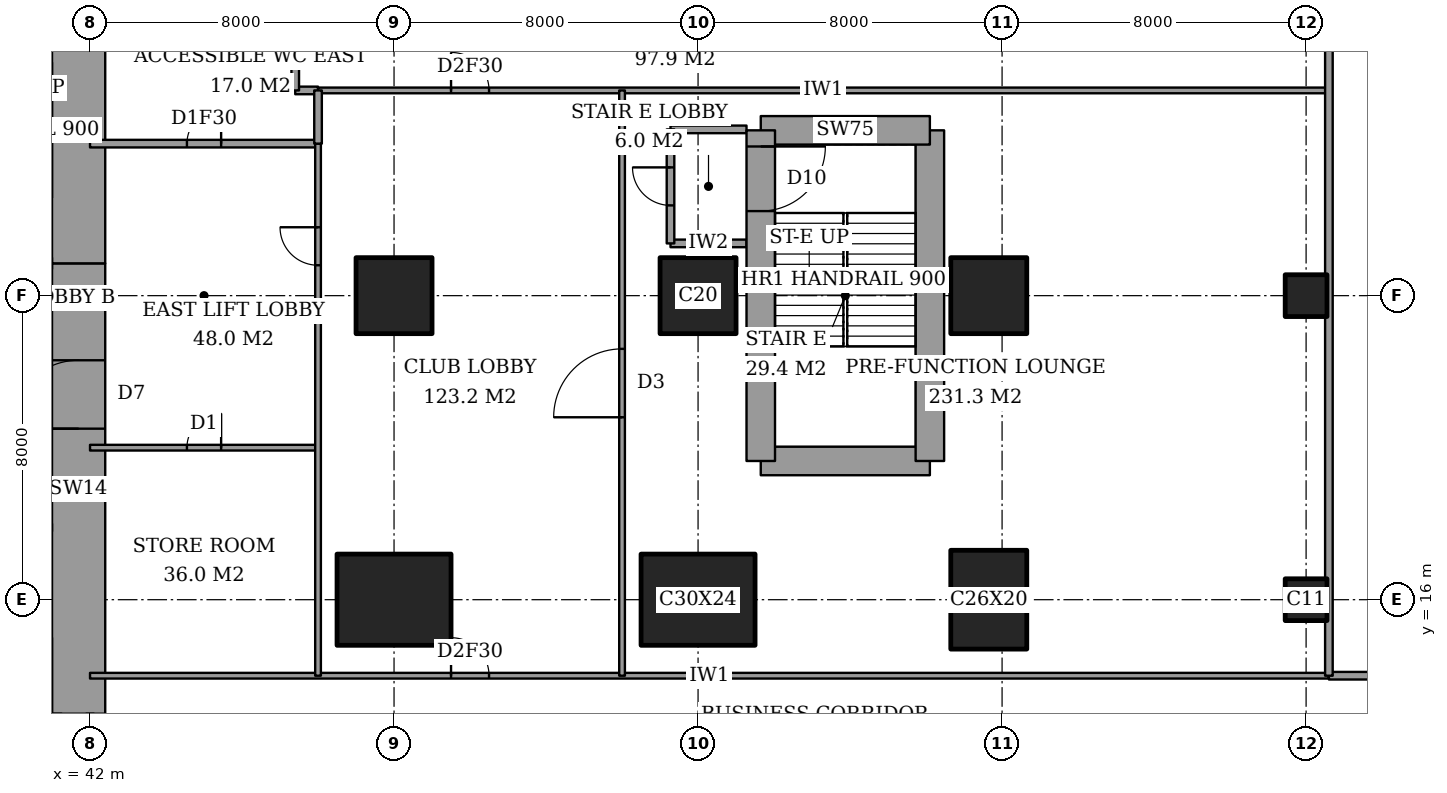
"""IFC4 building model, lengths in metres.
Left out: names, types, materials, properties, quantities, classifications, styles, units other than length and angle.
Written with IfcOpenShell. Run it as: python <this file> out.ifc"""

import sys

from ifc_helpers import new_model, si_unit, direction, frame, frame_2d, origin, origin_2d, place, context, subcontext, project, spatial, rectangle, extrude, element, fill, save


model = new_model("IFC4")
c1 = context("Model", 3, precision=1e-05, world=origin(), true_north=direction((0.0, 1.0)))
c2 = subcontext(c1, "Body", "Model", "MODEL_VIEW")
j1 = project(units=[si_unit("LENGTHUNIT", "METRE"), si_unit("PLANEANGLEUNIT", "RADIAN")], contexts=[c1])
p1 = place(None, origin())
s1 = spatial("IfcSite", under=j1, at=p1, CompositionType="ELEMENT")
p2 = place(p1, origin())
s2 = spatial("IfcBuilding", under=s1, at=p2, CompositionType="ELEMENT")
p3 = place(p2, frame((0.0, 0.0, 6.0)))
s3 = spatial("IfcBuildingStorey", under=s2, at=p3, CompositionType="ELEMENT", Elevation=6.0)
p4 = place(p3, frame((50.0, 16.0, 0.0), z_axis=(0.0, 0.0, 1.0), x_axis=(1.0, 0.0, 0.0)))
e1 = element("IfcColumn", 1, at=p4, inside=s3, PredefinedType="COLUMN", context=c2, shape_type="SweptSolid", body=[
    extrude(rectangle(XDim=3.0, YDim=2.4, at=origin_2d()), origin(), (0.0, 0.0, 1.0), 5.0),
])
p5 = place(p3, frame((50.0, 24.0, 0.0), z_axis=(0.0, 0.0, 1.0), x_axis=(1.0, 0.0, 0.0)))
e2 = element("IfcColumn", 2, at=p5, inside=s3, PredefinedType="COLUMN", context=c2, shape_type="SweptSolid", body=[
    extrude(rectangle(XDim=2.0, YDim=2.0, at=origin_2d()), origin(), (0.0, 0.0, 1.0), 5.0),
])
p6 = place(p3, frame((58.0, 16.0, 0.0), z_axis=(0.0, 0.0, 1.0), x_axis=(1.0, 0.0, 0.0)))
e3 = element("IfcColumn", 3, at=p6, inside=s3, PredefinedType="COLUMN", context=c2, shape_type="SweptSolid", body=[
    extrude(rectangle(XDim=3.0, YDim=2.4, at=origin_2d()), origin(), (0.0, 0.0, 1.0), 5.0),
])
p7 = place(p3, frame((58.0, 24.0, 0.0), z_axis=(0.0, 0.0, 1.0), x_axis=(1.0, 0.0, 0.0)))
e4 = element("IfcColumn", 4, at=p7, inside=s3, PredefinedType="COLUMN", context=c2, shape_type="SweptSolid", body=[
    extrude(rectangle(XDim=2.0, YDim=2.0, at=origin_2d()), origin(), (0.0, 0.0, 1.0), 5.0),
])
p8 = place(p3, frame((65.65, 16.0, 0.0), z_axis=(0.0, 0.0, 1.0), x_axis=(0.0, 1.0, 0.0)))
e5 = element("IfcColumn", 5, at=p8, inside=s3, PredefinedType="COLUMN", context=c2, shape_type="SweptSolid", body=[
    extrude(rectangle(XDim=2.6, YDim=2.0, at=origin_2d()), origin(), (0.0, 0.0, 1.0), 5.0),
])
p9 = place(p3, frame((65.65, 24.0, 0.0), z_axis=(0.0, 0.0, 1.0), x_axis=(1.0, 0.0, 0.0)))
e6 = element("IfcColumn", 6, at=p9, inside=s3, PredefinedType="COLUMN", context=c2, shape_type="SweptSolid", body=[
    extrude(rectangle(XDim=2.0, YDim=2.0, at=origin_2d()), origin(), (0.0, 0.0, 1.0), 5.0),
])
for number, where, z_axis, x_axis in (
    (7, (74.0, 16.0, 0.0), (0.0, 0.0, 1.0), (1.0, 0.0, 0.0)),
    (8, (74.0, 24.0, 0.0), (0.0, 0.0, 1.0), (1.0, 0.0, 0.0)),
):
    element("IfcColumn", number, at=place(p3, frame(where, z_axis=z_axis, x_axis=x_axis)), inside=s3, PredefinedType="COLUMN", context=c2, shape_type="SweptSolid", body=[
        extrude(rectangle(XDim=1.1, YDim=1.1, at=origin_2d()), origin(), (0.0, 0.0, 1.0), 5.0),
    ])
p10 = place(p3, frame((41.7, 13.0, 0.0), z_axis=(0.0, 0.0, 1.0), x_axis=(0.0, 1.0, 0.0)))
e9 = element("IfcWall", 9, at=p10, inside=s3, PredefinedType="SHEAR", context=c2, shape_type="SweptSolid", body=[
    extrude(rectangle(XDim=11.85, YDim=1.4, at=frame_2d((5.925, 0.0))), origin(), (0.0, 0.0, 1.0), 5.0),
])
p11 = place(p10, frame((7.5, 0.0, 0.0)))
e10 = element("IfcOpeningElement", 10, at=p11, cuts=e9, PredefinedType="OPENING", context=c2, shape_type="SweptSolid", body=[
    extrude(rectangle(XDim=1.8, YDim=2.4, at=frame_2d((0.9, 1.2))), frame((0.0, 0.71, 0.0), z_axis=(0.0, -1.0, 0.0), x_axis=(1.0, 0.0, 0.0)), (0.0, 0.0, 1.0), 1.42),
])
p12 = place(p3, frame((41.7, 24.85, 0.0), z_axis=(0.0, 0.0, 1.0), x_axis=(0.0, 1.0, 0.0)))
e11 = element("IfcWall", 11, at=p12, inside=s3, PredefinedType="SHEAR", context=c2, shape_type="SweptSolid", body=[
    extrude(rectangle(XDim=10.15, YDim=1.4, at=frame_2d((5.075, 0.0))), origin(), (0.0, 0.0, 1.0), 5.0),
])
p13 = place(p3, frame((59.65, 19.65, 0.0), z_axis=(0.0, 0.0, 1.0), x_axis=(1.0, 0.0, 0.0)))
e12 = element("IfcWall", 12, at=p13, inside=s3, PredefinedType="SHEAR", context=c2, shape_type="SweptSolid", body=[
    extrude(rectangle(XDim=4.45, YDim=0.75, at=frame_2d((2.225, 0.0))), origin(), (0.0, 0.0, 1.0), 5.0),
])
p14 = place(p3, frame((64.1, 19.65, 0.0), z_axis=(0.0, 0.0, 1.0), x_axis=(0.0, 1.0, 0.0)))
e13 = element("IfcWall", 13, at=p14, inside=s3, PredefinedType="SHEAR", context=c2, shape_type="SweptSolid", body=[
    extrude(rectangle(XDim=8.7, YDim=0.75, at=frame_2d((4.35, 0.0))), origin(), (0.0, 0.0, 1.0), 5.0),
])
p15 = place(p3, frame((64.1, 28.35, 0.0), z_axis=(0.0, 0.0, 1.0), x_axis=(-1.0, 0.0, 0.0)))
e14 = element("IfcWall", 14, at=p15, inside=s3, PredefinedType="SHEAR", context=c2, shape_type="SweptSolid", body=[
    extrude(rectangle(XDim=4.45, YDim=0.75, at=frame_2d((2.225, 0.0))), origin(), (0.0, 0.0, 1.0), 5.0),
])
p16 = place(p3, frame((59.65, 28.35, 0.0), z_axis=(0.0, 0.0, 1.0), x_axis=(0.0, -1.0, 0.0)))
e15 = element("IfcWall", 15, at=p16, inside=s3, PredefinedType="SHEAR", context=c2, shape_type="SweptSolid", body=[
    extrude(rectangle(XDim=8.7, YDim=0.75, at=frame_2d((4.35, 0.0))), origin(), (0.0, 0.0, 1.0), 5.0),
])
p17 = place(p16, frame((0.425, 0.0, 0.0)))
e16 = element("IfcOpeningElement", 16, at=p17, cuts=e15, PredefinedType="OPENING", context=c2, shape_type="SweptSolid", body=[
    extrude(rectangle(XDim=1.7, YDim=2.1, at=frame_2d((0.85, 1.05))), frame((0.0, 0.385, 0.0), z_axis=(0.0, -1.0, 0.0), x_axis=(1.0, 0.0, 0.0)), (0.0, 0.0, 1.0), 0.77),
])
p18 = place(p3, frame((74.6, 14.0, 0.0), z_axis=(0.0, 0.0, 1.0), x_axis=(1.0, 0.0, 0.0)))
e17 = element("IfcWall", 17, at=p18, inside=s3, PredefinedType="PARTITIONING", context=c2, shape_type="SweptSolid", body=[
    extrude(rectangle(XDim=7.85, YDim=0.2, at=frame_2d((3.925, 0.0))), origin(), (0.0, 0.0, 1.0), 4.7),
])
p19 = place(p3, frame((42.0, 14.0, 0.0), z_axis=(0.0, 0.0, 1.0), x_axis=(1.0, 0.0, 0.0)))
e18 = element("IfcWall", 18, at=p19, inside=s3, PredefinedType="PARTITIONING", context=c2, shape_type="SweptSolid", body=[
    extrude(rectangle(XDim=32.6, YDim=0.15, at=frame_2d((16.3, 0.0))), origin(), (0.0, 0.0, 1.0), 4.7),
])
p20 = place(p19, frame((9.5, 0.0, 0.0)))
e19 = element("IfcOpeningElement", 19, at=p20, cuts=e18, PredefinedType="OPENING", context=c2, shape_type="SweptSolid", body=[
    extrude(rectangle(XDim=1.0, YDim=2.1, at=frame_2d((0.5, 1.05))), frame((0.0, 0.085, 0.0), z_axis=(0.0, -1.0, 0.0), x_axis=(1.0, 0.0, 0.0)), (0.0, 0.0, 1.0), 0.17),
])
p21 = place(p3, frame((42.0, 20.0, 0.0), z_axis=(0.0, 0.0, 1.0), x_axis=(1.0, 0.0, 0.0)))
e20 = element("IfcWall", 20, at=p21, inside=s3, PredefinedType="PARTITIONING", context=c2, shape_type="SweptSolid", body=[
    extrude(rectangle(XDim=6.0, YDim=0.15, at=frame_2d((3.0, 0.0))), origin(), (0.0, 0.0, 1.0), 4.7),
])
p22 = place(p21, frame((2.55, 0.0, 0.0)))
e21 = element("IfcOpeningElement", 21, at=p22, cuts=e20, PredefinedType="OPENING", context=c2, shape_type="SweptSolid", body=[
    extrude(rectangle(XDim=0.9, YDim=2.1, at=frame_2d((0.45, 1.05))), frame((0.0, 0.085, 0.0), z_axis=(0.0, -1.0, 0.0), x_axis=(1.0, 0.0, 0.0)), (0.0, 0.0, 1.0), 0.17),
])
p23 = place(p3, frame((57.275, 25.375, 0.0), z_axis=(0.0, 0.0, 1.0), x_axis=(1.0, 0.0, 0.0)))
e22 = element("IfcWall", 22, at=p23, inside=s3, PredefinedType="PARTITIONING", context=c2, shape_type="SweptSolid", body=[
    extrude(rectangle(XDim=2.0, YDim=0.2, at=frame_2d((1.0, 0.0))), origin(), (0.0, 0.0, 1.0), 4.7),
])
p24 = place(p3, frame((42.0, 28.0, 0.0), z_axis=(0.0, 0.0, 1.0), x_axis=(1.0, 0.0, 0.0)))
e23 = element("IfcWall", 23, at=p24, inside=s3, PredefinedType="PARTITIONING", context=c2, shape_type="SweptSolid", body=[
    extrude(rectangle(XDim=6.0, YDim=0.2, at=frame_2d((3.0, 0.0))), origin(), (0.0, 0.0, 1.0), 4.7),
])
p25 = place(p24, frame((2.55, 0.0, 0.0)))
e24 = element("IfcOpeningElement", 24, at=p25, cuts=e23, PredefinedType="OPENING", context=c2, shape_type="SweptSolid", body=[
    extrude(rectangle(XDim=0.9, YDim=2.1, at=frame_2d((0.45, 1.05))), frame((0.0, 0.11, 0.0), z_axis=(0.0, -1.0, 0.0), x_axis=(1.0, 0.0, 0.0)), (0.0, 0.0, 1.0), 0.22),
])
p26 = place(p3, frame((57.275, 28.375, 0.0), z_axis=(0.0, 0.0, 1.0), x_axis=(1.0, 0.0, 0.0)))
e25 = element("IfcWall", 25, at=p26, inside=s3, PredefinedType="PARTITIONING", context=c2, shape_type="SweptSolid", body=[
    extrude(rectangle(XDim=2.0, YDim=0.2, at=frame_2d((1.0, 0.0))), origin(), (0.0, 0.0, 1.0), 4.7),
])
p27 = place(p3, frame((47.4, 29.4, 0.0), z_axis=(0.0, 0.0, 1.0), x_axis=(1.0, 0.0, 0.0)))
e26 = element("IfcWall", 26, at=p27, inside=s3, PredefinedType="PARTITIONING", context=c2, shape_type="SweptSolid", body=[
    extrude(rectangle(XDim=0.6, YDim=0.2, at=frame_2d((0.3, 0.0))), origin(), (0.0, 0.0, 1.0), 4.7),
])
p28 = place(p3, frame((48.0, 29.4, 0.0), z_axis=(0.0, 0.0, 1.0), x_axis=(1.0, 0.0, 0.0)))
e27 = element("IfcWall", 27, at=p28, inside=s3, PredefinedType="PARTITIONING", context=c2, shape_type="SweptSolid", body=[
    extrude(rectangle(XDim=26.6, YDim=0.15, at=frame_2d((13.3, 0.0))), origin(), (0.0, 0.0, 1.0), 4.7),
])
p29 = place(p28, frame((3.5, 0.0, 0.0)))
e28 = element("IfcOpeningElement", 28, at=p29, cuts=e27, PredefinedType="OPENING", context=c2, shape_type="SweptSolid", body=[
    extrude(rectangle(XDim=1.0, YDim=2.1, at=frame_2d((0.5, 1.05))), frame((0.0, 0.085, 0.0), z_axis=(0.0, -1.0, 0.0), x_axis=(1.0, 0.0, 0.0)), (0.0, 0.0, 1.0), 0.17),
])
p30 = place(p3, frame((41.15, -0.45, 0.0), z_axis=(0.0, 0.0, 1.0), x_axis=(0.0, 1.0, 0.0)))
e29 = element("IfcWall", 29, at=p30, inside=s3, PredefinedType="PARTITIONING", context=c2, shape_type="SweptSolid", body=[
    extrude(rectangle(XDim=13.45, YDim=0.2, at=frame_2d((6.725, 0.0))), origin(), (0.0, 0.0, 1.0), 4.7),
])
p31 = place(p3, frame((42.0, 9.3, 0.0), z_axis=(0.0, 0.0, 1.0), x_axis=(0.0, 1.0, 0.0)))
e30 = element("IfcWall", 30, at=p31, inside=s3, PredefinedType="PARTITIONING", context=c2, shape_type="SweptSolid", body=[
    extrude(rectangle(XDim=3.7, YDim=0.2, at=frame_2d((1.85, 0.0))), origin(), (0.0, 0.0, 1.0), 4.7),
])
p32 = place(p3, frame((47.4, 29.4, 0.0), z_axis=(0.0, 0.0, 1.0), x_axis=(0.0, 1.0, 0.0)))
e31 = element("IfcWall", 31, at=p32, inside=s3, PredefinedType="PARTITIONING", context=c2, shape_type="SweptSolid", body=[
    extrude(rectangle(XDim=3.6, YDim=0.2, at=frame_2d((1.8, 0.0))), origin(), (0.0, 0.0, 1.0), 4.7),
])
p33 = place(p3, frame((48.0, 28.0, 0.0), z_axis=(0.0, 0.0, 1.0), x_axis=(0.0, 1.0, 0.0)))
e32 = element("IfcWall", 32, at=p33, inside=s3, PredefinedType="PARTITIONING", context=c2, shape_type="SweptSolid", body=[
    extrude(rectangle(XDim=1.4, YDim=0.2, at=frame_2d((0.7, 0.0))), origin(), (0.0, 0.0, 1.0), 4.7),
])
p34 = place(p3, frame((48.0, 14.0, 0.0), z_axis=(0.0, 0.0, 1.0), x_axis=(0.0, 1.0, 0.0)))
e33 = element("IfcWall", 33, at=p34, inside=s3, PredefinedType="PARTITIONING", context=c2, shape_type="SweptSolid", body=[
    extrude(rectangle(XDim=14.0, YDim=0.15, at=frame_2d((7.0, 0.0))), origin(), (0.0, 0.0, 1.0), 4.7),
])
p35 = place(p34, frame((10.8, 0.0, 0.0)))
e34 = element("IfcOpeningElement", 34, at=p35, cuts=e33, PredefinedType="OPENING", context=c2, shape_type="SweptSolid", body=[
    extrude(rectangle(XDim=1.0, YDim=2.1, at=frame_2d((0.5, 1.05))), frame((0.0, 0.085, 0.0), z_axis=(0.0, -1.0, 0.0), x_axis=(1.0, 0.0, 0.0)), (0.0, 0.0, 1.0), 0.17),
])
p36 = place(p3, frame((56.0, 14.0, 0.0), z_axis=(0.0, 0.0, 1.0), x_axis=(0.0, 1.0, 0.0)))
e35 = element("IfcWall", 35, at=p36, inside=s3, PredefinedType="PARTITIONING", context=c2, shape_type="SweptSolid", body=[
    extrude(rectangle(XDim=15.4, YDim=0.15, at=frame_2d((7.7, 0.0))), origin(), (0.0, 0.0, 1.0), 4.7),
])
p37 = place(p36, frame((6.8, 0.0, 0.0)))
e36 = element("IfcOpeningElement", 36, at=p37, cuts=e35, PredefinedType="OPENING", context=c2, shape_type="SweptSolid", body=[
    extrude(rectangle(XDim=1.8, YDim=2.1, at=frame_2d((0.9, 1.05))), frame((0.0, 0.085, 0.0), z_axis=(0.0, -1.0, 0.0), x_axis=(1.0, 0.0, 0.0)), (0.0, 0.0, 1.0), 0.17),
])
p38 = place(p3, frame((57.275, 25.375, 0.0), z_axis=(0.0, 0.0, 1.0), x_axis=(0.0, 1.0, 0.0)))
e37 = element("IfcWall", 37, at=p38, inside=s3, PredefinedType="PARTITIONING", context=c2, shape_type="SweptSolid", body=[
    extrude(rectangle(XDim=3.0, YDim=0.2, at=frame_2d((1.5, 0.0))), origin(), (0.0, 0.0, 1.0), 4.7),
])
p39 = place(p38, frame((1.0, 0.0, 0.0)))
e38 = element("IfcOpeningElement", 38, at=p39, cuts=e37, PredefinedType="OPENING", context=c2, shape_type="SweptSolid", body=[
    extrude(rectangle(XDim=1.0, YDim=2.1, at=frame_2d((0.5, 1.05))), frame((0.0, 0.11, 0.0), z_axis=(0.0, -1.0, 0.0), x_axis=(1.0, 0.0, 0.0)), (0.0, 0.0, 1.0), 0.22),
])
p40 = place(p3, frame((74.6, 14.0, 0.0), z_axis=(0.0, 0.0, 1.0), x_axis=(0.0, 1.0, 0.0)))
e39 = element("IfcWall", 39, at=p40, inside=s3, PredefinedType="PARTITIONING", context=c2, shape_type="SweptSolid", body=[
    extrude(rectangle(XDim=42.45, YDim=0.2, at=frame_2d((21.225, 0.0))), origin(), (0.0, 0.0, 1.0), 4.7),
])
p41 = place(p3, frame((28.3, 17.9, 0.0), z_axis=(0.0, 0.0, 1.0), x_axis=(1.0, 0.0, 0.0)))
e40 = element("IfcWall", 40, at=p41, inside=s3, PredefinedType="PARTITIONING", context=c2, shape_type="SweptSolid", body=[
    extrude(rectangle(XDim=12.7, YDim=0.2, at=frame_2d((6.35, 0.0))), origin(), (0.0, 0.0, 1.0), 5.0),
])
p42 = place(p41, frame((0.95, 0.0, 0.0)))
e41 = element("IfcOpeningElement", 41, at=p42, cuts=e40, PredefinedType="OPENING", context=c2, shape_type="SweptSolid", body=[
    extrude(rectangle(XDim=1.1, YDim=2.1, at=frame_2d((0.55, 1.05))), frame((0.0, 0.11, 0.0), z_axis=(0.0, -1.0, 0.0), x_axis=(1.0, 0.0, 0.0)), (0.0, 0.0, 1.0), 0.22),
])
p43 = place(p41, frame((4.15, 0.0, 0.0)))
e42 = element("IfcOpeningElement", 42, at=p43, cuts=e40, PredefinedType="OPENING", context=c2, shape_type="SweptSolid", body=[
    extrude(rectangle(XDim=1.1, YDim=2.1, at=frame_2d((0.55, 1.05))), frame((0.0, 0.11, 0.0), z_axis=(0.0, -1.0, 0.0), x_axis=(1.0, 0.0, 0.0)), (0.0, 0.0, 1.0), 0.22),
])
p44 = place(p41, frame((7.35, 0.0, 0.0)))
e43 = element("IfcOpeningElement", 43, at=p44, cuts=e40, PredefinedType="OPENING", context=c2, shape_type="SweptSolid", body=[
    extrude(rectangle(XDim=1.1, YDim=2.1, at=frame_2d((0.55, 1.05))), frame((0.0, 0.11, 0.0), z_axis=(0.0, -1.0, 0.0), x_axis=(1.0, 0.0, 0.0)), (0.0, 0.0, 1.0), 0.22),
])
p45 = place(p41, frame((10.6, 0.0, 0.0)))
e44 = element("IfcOpeningElement", 44, at=p45, cuts=e40, PredefinedType="OPENING", context=c2, shape_type="SweptSolid", body=[
    extrude(rectangle(XDim=1.2, YDim=2.1, at=frame_2d((0.6, 1.05))), frame((0.0, 0.11, 0.0), z_axis=(0.0, -1.0, 0.0), x_axis=(1.0, 0.0, 0.0)), (0.0, 0.0, 1.0), 0.22),
])
p46 = place(p35, origin())
e45 = element("IfcDoor", 45, at=p46, inside=s3, OperationType="SINGLE_SWING_LEFT", PredefinedType="DOOR", context=c2, shape_type="SweptSolid", body=[
    extrude(rectangle(XDim=1.0, YDim=2.1, at=frame_2d((0.5, 1.05))), frame((0.0, 0.025, 0.0), z_axis=(0.0, -1.0, 0.0), x_axis=(1.0, 0.0, 0.0)), (0.0, 0.0, 1.0), 0.05),
])
fill(e34, e45)
p47 = place(p37, origin())
e46 = element("IfcDoor", 46, at=p47, inside=s3, OperationType="DOUBLE_DOOR_DOUBLE_SWING", PredefinedType="DOOR", context=c2, shape_type="SweptSolid", body=[
    extrude(rectangle(XDim=1.8, YDim=2.1, at=frame_2d((0.9, 1.05))), frame((0.0, 0.025, 0.0), z_axis=(0.0, -1.0, 0.0), x_axis=(1.0, 0.0, 0.0)), (0.0, 0.0, 1.0), 0.05),
])
fill(e36, e46)
p48 = place(p20, origin())
e47 = element("IfcDoor", 47, at=p48, inside=s3, OperationType="SINGLE_SWING_RIGHT", PredefinedType="DOOR", context=c2, shape_type="SweptSolid", body=[
    extrude(rectangle(XDim=1.0, YDim=2.1, at=frame_2d((0.5, 1.05))), frame((0.0, 0.025, 0.0), z_axis=(0.0, -1.0, 0.0), x_axis=(1.0, 0.0, 0.0)), (0.0, 0.0, 1.0), 0.05),
])
fill(e19, e47)
p49 = place(p29, origin())
e48 = element("IfcDoor", 48, at=p49, inside=s3, OperationType="SINGLE_SWING_RIGHT", PredefinedType="DOOR", context=c2, shape_type="SweptSolid", body=[
    extrude(rectangle(XDim=1.0, YDim=2.1, at=frame_2d((0.5, 1.05))), frame((0.0, 0.025, 0.0), z_axis=(0.0, -1.0, 0.0), x_axis=(1.0, 0.0, 0.0)), (0.0, 0.0, 1.0), 0.05),
])
fill(e28, e48)
p50 = place(p25, origin())
e49 = element("IfcDoor", 49, at=p50, inside=s3, OperationType="SINGLE_SWING_LEFT", PredefinedType="DOOR", context=c2, shape_type="SweptSolid", body=[
    extrude(rectangle(XDim=0.9, YDim=2.1, at=frame_2d((0.45, 1.05))), frame((0.0, 0.025, 0.0), z_axis=(0.0, -1.0, 0.0), x_axis=(1.0, 0.0, 0.0)), (0.0, 0.0, 1.0), 0.05),
])
fill(e24, e49)
p51 = place(p22, origin())
e50 = element("IfcDoor", 50, at=p51, inside=s3, OperationType="SINGLE_SWING_LEFT", PredefinedType="DOOR", context=c2, shape_type="SweptSolid", body=[
    extrude(rectangle(XDim=0.9, YDim=2.1, at=frame_2d((0.45, 1.05))), frame((0.0, 0.025, 0.0), z_axis=(0.0, -1.0, 0.0), x_axis=(1.0, 0.0, 0.0)), (0.0, 0.0, 1.0), 0.05),
])
fill(e21, e50)
p52 = place(p39, origin())
e51 = element("IfcDoor", 51, at=p52, inside=s3, OperationType="SINGLE_SWING_LEFT", PredefinedType="DOOR", context=c2, shape_type="SweptSolid", body=[
    extrude(rectangle(XDim=1.0, YDim=2.1, at=frame_2d((0.5, 1.05))), frame((0.0, 0.025, 0.0), z_axis=(0.0, -1.0, 0.0), x_axis=(1.0, 0.0, 0.0)), (0.0, 0.0, 1.0), 0.05),
])
fill(e38, e51)
p53 = place(p11, origin())
e52 = element("IfcDoor", 52, at=p53, inside=s3, OperationType="DOUBLE_DOOR_DOUBLE_SWING", PredefinedType="DOOR", context=c2, shape_type="SweptSolid", body=[
    extrude(rectangle(XDim=1.8, YDim=2.4, at=frame_2d((0.9, 1.2))), frame((0.0, 0.025, 0.0), z_axis=(0.0, -1.0, 0.0), x_axis=(1.0, 0.0, 0.0)), (0.0, 0.0, 1.0), 0.05),
])
fill(e10, e52)
p54 = place(p17, origin())
e53 = element("IfcDoor", 53, at=p54, inside=s3, OperationType="DOUBLE_DOOR_SINGLE_SWING", PredefinedType="DOOR", context=c2, shape_type="SweptSolid", body=[
    extrude(rectangle(XDim=1.7, YDim=2.1, at=frame_2d((0.85, 1.05))), frame((0.0, 0.025, 0.0), z_axis=(0.0, -1.0, 0.0), x_axis=(1.0, 0.0, 0.0)), (0.0, 0.0, 1.0), 0.05),
])
fill(e16, e53)
save(model, sys.argv[1])
